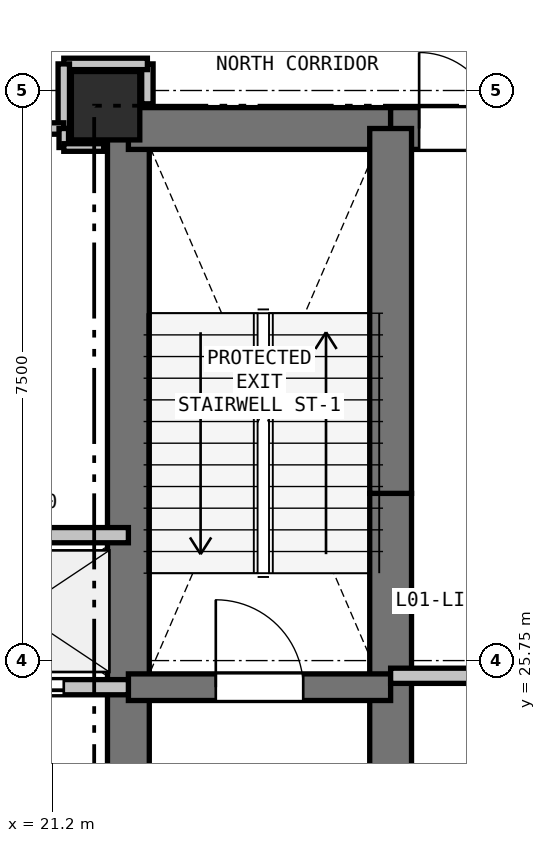
"""IFC4 building model, lengths in metres.
Left out: names, types, materials, properties, quantities, classifications, styles, units other than length and angle.
Written with IfcOpenShell. Run it as: python <this file> out.ifc"""

import sys

from ifc_helpers import new_model, si_unit, direction, frame, frame_2d, origin, origin_2d, place, context, subcontext, project, spatial, rectangle, extrude, element, fill, save


model = new_model("IFC4")
c1 = context("Model", 3, precision=1e-05, world=origin(), true_north=direction((0.0, 1.0)))
c2 = subcontext(c1, "Body", "Model", "MODEL_VIEW")
j1 = project(units=[si_unit("LENGTHUNIT", "METRE"), si_unit("PLANEANGLEUNIT", "RADIAN")], contexts=[c1])
p1 = place(None, origin())
s1 = spatial("IfcSite", under=j1, at=p1, CompositionType="ELEMENT")
p2 = place(p1, origin())
s2 = spatial("IfcBuilding", under=s1, at=p2, CompositionType="ELEMENT")
p3 = place(p2, frame((0.0, 0.0, 5.1)))
s3 = spatial("IfcBuildingStorey", under=s2, at=p3, CompositionType="ELEMENT", Elevation=5.1)
p4 = place(p3, frame((21.9, 33.05, 0.0), z_axis=(0.0, 0.0, 1.0), x_axis=(1.0, 0.0, 0.0)))
e1 = element("IfcColumn", 1, at=p4, inside=s3, PredefinedType="COLUMN", context=c2, shape_type="SweptSolid", body=[
    extrude(rectangle(XDim=0.9, YDim=0.9, at=origin_2d()), origin(), (0.0, 0.0, 1.0), 4.5),
])
p5 = place(p3, frame((22.2, 20.75, 0.0), z_axis=(0.0, 0.0, 1.0), x_axis=(0.0, 1.0, 0.0)))
e2 = element("IfcWall", 2, at=p5, inside=s3, PredefinedType="SHEAR", context=c2, shape_type="SweptSolid", body=[
    extrude(rectangle(XDim=4.65, YDim=0.55, at=frame_2d((2.325, 0.0))), origin(), (0.0, 0.0, 1.0), 4.18),
])
p6 = place(p3, frame((22.2, 25.4, 0.0), z_axis=(0.0, 0.0, 1.0), x_axis=(0.0, 1.0, 0.0)))
e3 = element("IfcWall", 3, at=p6, inside=s3, PredefinedType="SHEAR", context=c2, shape_type="SweptSolid", body=[
    extrude(rectangle(XDim=7.35, YDim=0.55, at=frame_2d((3.675, 0.0))), origin(), (0.0, 0.0, 1.0), 4.18),
])
p7 = place(p3, frame((22.2, 32.75, 0.0), z_axis=(0.0, 0.0, 1.0), x_axis=(1.0, 0.0, 0.0)))
e4 = element("IfcWall", 4, at=p7, inside=s3, PredefinedType="SHEAR", context=c2, shape_type="SweptSolid", body=[
    extrude(rectangle(XDim=3.45, YDim=0.55, at=frame_2d((1.725, 0.0))), origin(), (0.0, 0.0, 1.0), 4.18),
])
p8 = place(p3, frame((25.65, 32.75, 0.0), z_axis=(0.0, 0.0, 1.0), x_axis=(1.0, 0.0, 0.0)))
e5 = element("IfcWall", 5, at=p8, inside=s3, PredefinedType="SHEAR", context=c2, shape_type="SweptSolid", body=[
    extrude(rectangle(XDim=1.75, YDim=0.55, at=frame_2d((0.875, 0.0))), origin(), (0.0, 0.0, 1.0), 4.18),
])
p9 = place(p8, frame((0.375, 0.0, 0.0)))
e6 = element("IfcOpeningElement", 6, at=p9, cuts=e5, PredefinedType="OPENING", context=c2, shape_type="SweptSolid", body=[
    extrude(rectangle(XDim=1.0, YDim=2.15, at=frame_2d((0.5, 1.075))), frame((0.0, 0.285, 0.0), z_axis=(0.0, -1.0, 0.0), x_axis=(1.0, 0.0, 0.0)), (0.0, 0.0, 1.0), 0.57),
])
p10 = place(p3, frame((25.65, 22.75, 0.0), z_axis=(0.0, 0.0, 1.0), x_axis=(0.0, 1.0, 0.0)))
e7 = element("IfcWall", 7, at=p10, inside=s3, PredefinedType="SHEAR", context=c2, shape_type="SweptSolid", body=[
    extrude(rectangle(XDim=2.8, YDim=0.55, at=frame_2d((1.4, 0.0))), origin(), (0.0, 0.0, 1.0), 4.18),
])
p11 = place(p3, frame((25.65, 25.55, 0.0), z_axis=(0.0, 0.0, 1.0), x_axis=(0.0, 1.0, 0.0)))
e8 = element("IfcWall", 8, at=p11, inside=s3, PredefinedType="SHEAR", context=c2, shape_type="SweptSolid", body=[
    extrude(rectangle(XDim=2.4, YDim=0.55, at=frame_2d((1.2, 0.0))), origin(), (0.0, 0.0, 1.0), 4.18),
])
p12 = place(p3, frame((25.65, 27.95, 0.0), z_axis=(0.0, 0.0, 1.0), x_axis=(0.0, 1.0, 0.0)))
e9 = element("IfcWall", 9, at=p12, inside=s3, PredefinedType="SHEAR", context=c2, shape_type="SweptSolid", body=[
    extrude(rectangle(XDim=4.8, YDim=0.55, at=frame_2d((2.4, 0.0))), origin(), (0.0, 0.0, 1.0), 4.18),
])
p13 = place(p3, frame((22.2, 25.4, 0.0), z_axis=(0.0, 0.0, 1.0), x_axis=(1.0, 0.0, 0.0)))
e10 = element("IfcWall", 10, at=p13, inside=s3, PredefinedType="SHEAR", context=c2, shape_type="SweptSolid", body=[
    extrude(rectangle(XDim=3.45, YDim=0.35, at=frame_2d((1.725, 0.0))), origin(), (0.0, 0.0, 1.0), 4.18),
])
p14 = place(p13, frame((1.15, 0.0, 0.0)))
e11 = element("IfcOpeningElement", 11, at=p14, cuts=e10, PredefinedType="OPENING", context=c2, shape_type="SweptSolid", body=[
    extrude(rectangle(XDim=1.15, YDim=2.15, at=frame_2d((0.575, 1.075))), frame((0.0, 0.185, 0.0), z_axis=(0.0, -1.0, 0.0), x_axis=(1.0, 0.0, 0.0)), (0.0, 0.0, 1.0), 0.37),
])
p15 = place(p3, frame((25.65, 25.55, 0.0), z_axis=(0.0, 0.0, 1.0), x_axis=(1.0, 0.0, 0.0)))
e12 = element("IfcWall", 12, at=p15, inside=s3, PredefinedType="PARTITIONING", context=c2, shape_type="SweptSolid", body=[
    extrude(rectangle(XDim=4.95, YDim=0.2, at=frame_2d((2.475, 0.0))), origin(), (0.0, 0.0, 1.0), 4.18),
])
p16 = place(p3, frame((19.4, 27.4, 0.0), z_axis=(0.0, 0.0, 1.0), x_axis=(1.0, 0.0, 0.0)))
e13 = element("IfcWall", 13, at=p16, inside=s3, PredefinedType="PARTITIONING", context=c2, shape_type="SweptSolid", body=[
    extrude(rectangle(XDim=2.8, YDim=0.2, at=frame_2d((1.4, 0.0))), origin(), (0.0, 0.0, 1.0), 3.628),
])
p17 = place(p3, frame((22.2, 25.4, 0.0), z_axis=(0.0, 0.0, 1.0), x_axis=(-1.0, 0.0, 0.0)))
e14 = element("IfcWall", 14, at=p17, inside=s3, PredefinedType="PARTITIONING", context=c2, shape_type="SweptSolid", body=[
    extrude(rectangle(XDim=2.8, YDim=0.2, at=frame_2d((1.4, 0.0))), origin(), (0.0, 0.0, 1.0), 2.565),
])
p18 = place(p17, frame((0.85, 0.0, 0.0)))
e15 = element("IfcOpeningElement", 15, at=p18, cuts=e14, PredefinedType="OPENING", context=c2, shape_type="SweptSolid", body=[
    extrude(rectangle(XDim=1.3, YDim=2.2, at=frame_2d((0.65, 1.1))), frame((0.0, 0.11, 0.0), z_axis=(0.0, -1.0, 0.0), x_axis=(1.0, 0.0, 0.0)), (0.0, 0.0, 1.0), 0.22),
])
p19 = place(p3, frame((22.45, 33.075, 0.0), z_axis=(0.0, 0.0, 1.0), x_axis=(0.0, 1.0, 0.0)))
e16 = element("IfcWall", 16, at=p19, inside=s3, PredefinedType="PARTITIONING", context=c2, shape_type="SweptSolid", body=[
    extrude(rectangle(XDim=0.525, YDim=0.15, at=frame_2d((0.263, 0.0))), origin(), (0.0, 0.0, 1.0), 3.628),
])
p20 = place(p3, frame((22.45, 33.6, 0.0), z_axis=(0.0, 0.0, 1.0), x_axis=(-1.0, 0.0, 0.0)))
e17 = element("IfcWall", 17, at=p20, inside=s3, PredefinedType="PARTITIONING", context=c2, shape_type="SweptSolid", body=[
    extrude(rectangle(XDim=1.1, YDim=0.15, at=frame_2d((0.55, 0.0))), origin(), (0.0, 0.0, 1.0), 4.18),
])
p21 = place(p3, frame((21.35, 33.6, 0.0), z_axis=(0.0, 0.0, 1.0), x_axis=(0.0, -1.0, 0.0)))
e18 = element("IfcWall", 18, at=p21, inside=s3, PredefinedType="PARTITIONING", context=c2, shape_type="SweptSolid", body=[
    extrude(rectangle(XDim=0.85, YDim=0.15, at=frame_2d((0.425, 0.0))), origin(), (0.0, 0.0, 1.0), 4.18),
])
p22 = place(p3, frame((21.35, 32.75, 0.0), z_axis=(0.0, 0.0, 1.0), x_axis=(-1.0, 0.0, 0.0)))
e19 = element("IfcWall", 19, at=p22, inside=s3, PredefinedType="PARTITIONING", context=c2, shape_type="SweptSolid", body=[
    extrude(rectangle(XDim=3.001, YDim=0.15, at=frame_2d((1.5, 0.0))), origin(), (0.0, 0.0, 1.0), 4.18),
])
p23 = place(p22, frame((0.7, 0.0, 0.0)))
e20 = element("IfcOpeningElement", 20, at=p23, cuts=e19, PredefinedType="OPENING", context=c2, shape_type="SweptSolid", body=[
    extrude(rectangle(XDim=1.6, YDim=2.2, at=frame_2d((0.8, 1.1))), frame((0.0, 0.085, 0.0), z_axis=(0.0, -1.0, 0.0), x_axis=(1.0, 0.0, 0.0)), (0.0, 0.0, 1.0), 0.17),
])
p24 = place(p3, frame((21.35, 32.75, 0.0), z_axis=(0.0, 0.0, 1.0), x_axis=(0.0, -1.0, 0.0)))
e21 = element("IfcWall", 21, at=p24, inside=s3, PredefinedType="PARTITIONING", context=c2, shape_type="SweptSolid", body=[
    extrude(rectangle(XDim=0.25, YDim=0.125, at=frame_2d((0.125, 0.0))), origin(), (0.0, 0.0, 1.0), 4.18),
])
p25 = place(p3, frame((21.35, 32.5, 0.0), z_axis=(0.0, 0.0, 1.0), x_axis=(1.0, 0.0, 0.0)))
e22 = element("IfcWall", 22, at=p25, inside=s3, PredefinedType="PARTITIONING", context=c2, shape_type="SweptSolid", body=[
    extrude(rectangle(XDim=0.525, YDim=0.1, at=frame_2d((0.262, 0.0))), origin(), (0.0, 0.0, 1.0), 3.628),
])
p26 = place(p9, origin())
e23 = element("IfcDoor", 23, at=p26, inside=s3, OperationType="SINGLE_SWING_LEFT", PredefinedType="DOOR", context=c2, shape_type="SweptSolid", body=[
    extrude(rectangle(XDim=1.0, YDim=2.15, at=frame_2d((0.5, 1.075))), frame((0.0, 0.025, 0.0), z_axis=(0.0, -1.0, 0.0), x_axis=(1.0, 0.0, 0.0)), (0.0, 0.0, 1.0), 0.05),
])
fill(e6, e23)
p27 = place(p18, origin())
e24 = element("IfcDoor", 24, at=p27, inside=s3, OperationType="SLIDING_TO_LEFT", PredefinedType="DOOR", context=c2, shape_type="SweptSolid", body=[
    extrude(rectangle(XDim=1.3, YDim=2.2, at=frame_2d((0.65, 1.1))), frame((0.0, 0.025, 0.0), z_axis=(0.0, -1.0, 0.0), x_axis=(1.0, 0.0, 0.0)), (0.0, 0.0, 1.0), 0.05),
])
fill(e15, e24)
p28 = place(p14, origin())
e25 = element("IfcDoor", 25, at=p28, inside=s3, OperationType="SINGLE_SWING_LEFT", PredefinedType="DOOR", context=c2, shape_type="SweptSolid", body=[
    extrude(rectangle(XDim=1.15, YDim=2.15, at=frame_2d((0.575, 1.075))), frame((0.0, 0.025, 0.0), z_axis=(0.0, -1.0, 0.0), x_axis=(1.0, 0.0, 0.0)), (0.0, 0.0, 1.0), 0.05),
])
fill(e11, e25)
save(model, sys.argv[1])
